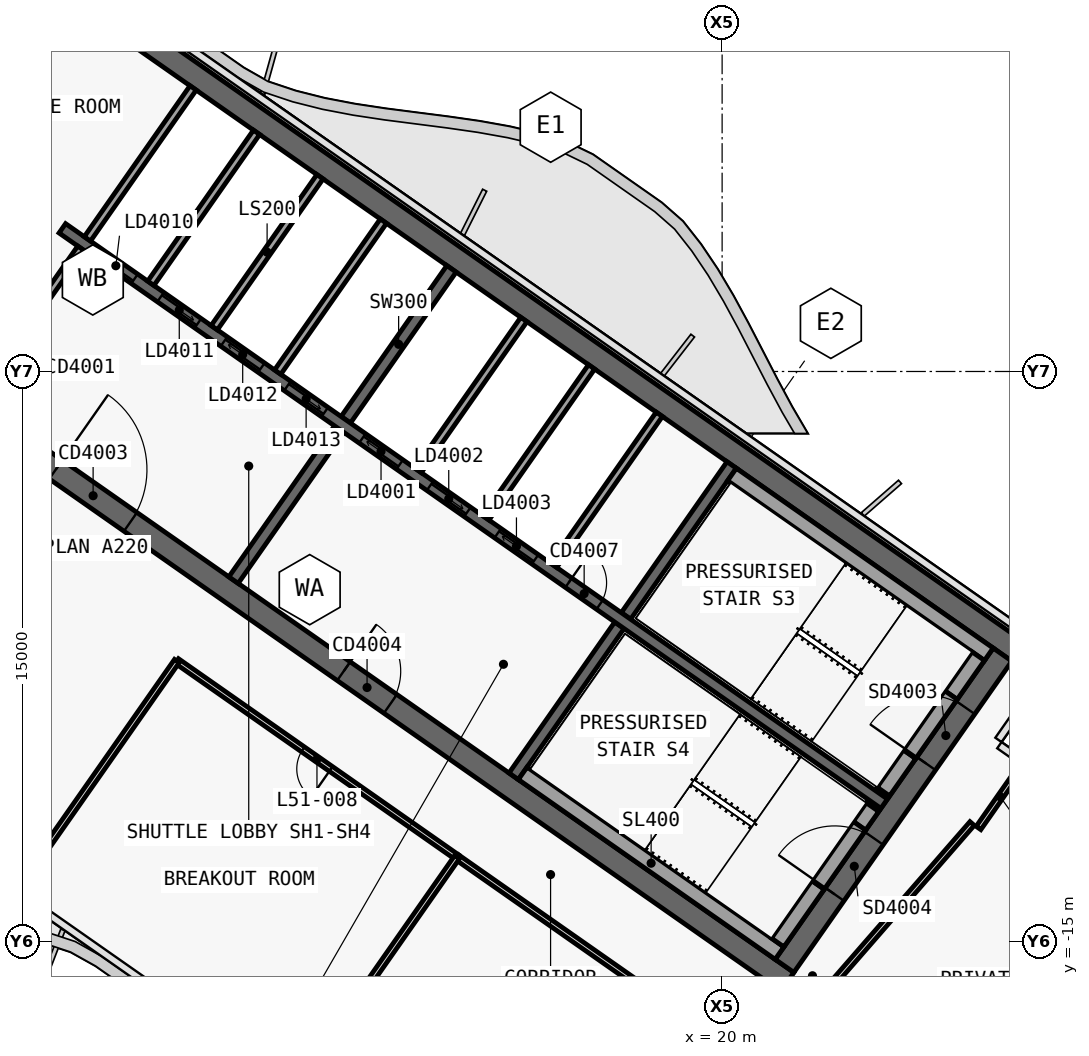
"""IFC4 building model, lengths in metres.
Left out: names, types, materials, properties, quantities, classifications, styles, units other than length and angle.
Written with IfcOpenShell. Run it as: python <this file> out.ifc"""

import sys

from ifc_helpers import new_model, si_unit, direction, frame, frame_2d, origin, place, context, subcontext, project, spatial, polyline, rectangle, outline, extrude, element, fill, save


model = new_model("IFC4")
c1 = context("Model", 3, precision=1e-05, world=origin(), true_north=direction((0.0, 1.0)))
c2 = subcontext(c1, "Body", "Model", "MODEL_VIEW")
j1 = project(units=[si_unit("LENGTHUNIT", "METRE"), si_unit("PLANEANGLEUNIT", "RADIAN")], contexts=[c1])
p1 = place(None, origin())
s1 = spatial("IfcSite", under=j1, at=p1, CompositionType="ELEMENT")
p2 = place(p1, origin())
s2 = spatial("IfcBuilding", under=s1, at=p2, CompositionType="ELEMENT")
p3 = place(p2, frame((0.0, 0.0, 219.4)))
s3 = spatial("IfcBuildingStorey", under=s2, at=p3, CompositionType="ELEMENT", Elevation=219.4)
p4 = place(p3, frame((0.028, 12.066, 0.0), z_axis=(0.0, 0.0, 1.0), x_axis=(0.819151382952, -0.573577380837, 0.0)))
e1 = element("IfcWall", 1, at=p4, inside=s3, PredefinedType="SHEAR", context=c2, shape_type="SweptSolid", body=[
    extrude(outline(polyline([(33.898, 0.3), (0.0, 0.3), (0.42, -0.3), (33.898, -0.3), (33.898, 0.3)])), origin(), (0.0, 0.0, 1.0), 6.0),
])
p5 = place(p3, frame((0.028, -0.874, 0.0), z_axis=(0.0, 0.0, 1.0), x_axis=(0.819150035022, -0.573579305871, 0.0)))
e2 = element("IfcWall", 2, at=p5, inside=s3, PredefinedType="SHEAR", context=c2, shape_type="SweptSolid", body=[
    extrude(outline(polyline([(26.476, 0.3), (0.0, 0.3), (0.42, -0.3), (26.476, -0.3), (26.476, 0.3)])), origin(), (0.0, 0.0, 1.0), 6.0),
])
p6 = place(p5, frame((2.976, 0.0, 0.0)))
e3 = element("IfcOpeningElement", 3, at=p6, cuts=e2, PredefinedType="OPENING", context=c2, shape_type="SweptSolid", body=[
    extrude(rectangle(XDim=2.4, YDim=2.1, at=frame_2d((1.2, 1.05))), frame((0.0, 0.31, 0.0), z_axis=(0.0, -1.0, 0.0), x_axis=(1.0, 0.0, 0.0)), (0.0, 0.0, 1.0), 0.62),
])
p7 = place(p5, frame((12.226, 0.0, 0.0)))
e4 = element("IfcOpeningElement", 4, at=p7, cuts=e2, PredefinedType="OPENING", context=c2, shape_type="SweptSolid", body=[
    extrude(rectangle(XDim=1.5, YDim=2.1, at=frame_2d((0.75, 1.05))), frame((0.0, 0.31, 0.0), z_axis=(0.0, -1.0, 0.0), x_axis=(1.0, 0.0, 0.0)), (0.0, 0.0, 1.0), 0.62),
])
p8 = place(p3, frame((21.642, -15.642, 0.0), z_axis=(0.0, 0.0, 1.0), x_axis=(0.573586866468, 0.819144740944, 0.0)))
e5 = element("IfcWall", 5, at=p8, inside=s3, PredefinedType="SHEAR", context=c2, shape_type="SweptSolid", body=[
    extrude(outline(polyline([(10.0, 0.3), (0.0, 0.3), (0.0, -0.3), (10.0, -0.3), (10.0, 0.3)])), origin(), (0.0, 0.0, 1.0), 6.0),
])
p9 = place(p8, frame((6.5, 0.0, 0.0)))
e6 = element("IfcOpeningElement", 6, at=p9, cuts=e5, PredefinedType="OPENING", context=c2, shape_type="SweptSolid", body=[
    extrude(rectangle(XDim=1.8, YDim=2.1, at=frame_2d((0.9, 1.05))), frame((0.0, 0.31, 0.0), z_axis=(0.0, -1.0, 0.0), x_axis=(1.0, 0.0, 0.0)), (0.0, 0.0, 1.0), 0.62),
])
p10 = place(p8, frame((2.3, 0.0, 0.0)))
e7 = element("IfcOpeningElement", 7, at=p10, cuts=e5, PredefinedType="OPENING", context=c2, shape_type="SweptSolid", body=[
    extrude(rectangle(XDim=1.8, YDim=2.1, at=frame_2d((0.9, 1.05))), frame((0.0, 0.31, 0.0), z_axis=(0.0, -1.0, 0.0), x_axis=(1.0, 0.0, 0.0)), (0.0, 0.0, 1.0), 0.62),
])
p11 = place(p3, frame((7.143, -5.49, 0.0), z_axis=(0.0, 0.0, 1.0), x_axis=(0.573617744349, 0.819123118565, 0.0)))
e8 = element("IfcWall", 8, at=p11, inside=s3, PredefinedType="SHEAR", context=c2, shape_type="SweptSolid", body=[
    extrude(outline(polyline([(0.0, 0.15), (0.0, -0.15), (4.85, -0.15), (4.85, 0.15), (0.0, 0.15)])), origin(), (0.0, 0.0, 1.0), 6.0),
])
p12 = place(p3, frame((10.097, -1.271, 0.0), z_axis=(0.0, 0.0, 1.0), x_axis=(0.573560315113, 0.819163332265, 0.0)))
e9 = element("IfcWall", 9, at=p12, inside=s3, PredefinedType="SHEAR", context=c2, shape_type="SweptSolid", body=[
    extrude(outline(polyline([(4.85, -0.15), (4.85, 0.15), (0.0, 0.15), (0.0, -0.15), (4.85, -0.15)])), origin(), (0.0, 0.0, 1.0), 6.0),
])
p13 = place(p3, frame((14.515, -10.652, 0.0), z_axis=(0.0, 0.0, 1.0), x_axis=(0.573560315113, 0.819163332265, 0.0)))
e10 = element("IfcWall", 10, at=p13, inside=s3, PredefinedType="SHEAR", context=c2, shape_type="SweptSolid", body=[
    extrude(outline(polyline([(0.0, 0.15), (0.0, -0.15), (4.85, -0.15), (4.85, 0.15), (0.0, 0.15)])), origin(), (0.0, 0.0, 1.0), 6.0),
])
p14 = place(p3, frame((17.469, -6.433, 0.0), z_axis=(0.0, 0.0, 1.0), x_axis=(0.573594092424, 0.81913968109, 0.0)))
e11 = element("IfcWall", 11, at=p14, inside=s3, PredefinedType="SHEAR", context=c2, shape_type="SweptSolid", body=[
    extrude(outline(polyline([(4.85, -0.15), (4.85, 0.15), (0.0, 0.15), (0.0, -0.15), (4.85, -0.15)])), origin(), (0.0, 0.0, 1.0), 6.0),
])
p15 = place(p3, frame((2.638, 3.768, 0.0), z_axis=(0.0, 0.0, 1.0), x_axis=(0.819155014212, -0.573572194837, 0.0)))
e12 = element("IfcWall", 12, at=p15, inside=s3, PredefinedType="SHEAR", context=c2, shape_type="SweptSolid", body=[
    extrude(outline(polyline([(0.0, 0.15), (0.0, -0.15), (26.4, -0.15), (26.4, 0.15), (0.0, 0.15)])), origin(), (0.0, 0.0, 1.0), 6.0),
])
p16 = place(p15, frame((1.119, 0.0, 0.0)))
e13 = element("IfcOpeningElement", 13, at=p16, cuts=e12, PredefinedType="OPENING", context=c2, shape_type="SweptSolid", body=[
    extrude(rectangle(XDim=1.2, YDim=2.1, at=frame_2d((0.6, 1.05))), frame((0.0, 0.16, 0.0), z_axis=(0.0, -1.0, 0.0), x_axis=(1.0, 0.0, 0.0)), (0.0, 0.0, 1.0), 0.32),
])
p17 = place(p15, frame((3.156, 0.0, 0.0)))
e14 = element("IfcOpeningElement", 14, at=p17, cuts=e12, PredefinedType="OPENING", context=c2, shape_type="SweptSolid", body=[
    extrude(rectangle(XDim=1.2, YDim=2.1, at=frame_2d((0.6, 1.05))), frame((0.0, 0.16, 0.0), z_axis=(0.0, -1.0, 0.0), x_axis=(1.0, 0.0, 0.0)), (0.0, 0.0, 1.0), 0.32),
])
p18 = place(p15, frame((5.194, 0.0, 0.0)))
e15 = element("IfcOpeningElement", 15, at=p18, cuts=e12, PredefinedType="OPENING", context=c2, shape_type="SweptSolid", body=[
    extrude(rectangle(XDim=1.2, YDim=2.1, at=frame_2d((0.6, 1.05))), frame((0.0, 0.16, 0.0), z_axis=(0.0, -1.0, 0.0), x_axis=(1.0, 0.0, 0.0)), (0.0, 0.0, 1.0), 0.32),
])
p19 = place(p15, frame((7.231, 0.0, 0.0)))
e16 = element("IfcOpeningElement", 16, at=p19, cuts=e12, PredefinedType="OPENING", context=c2, shape_type="SweptSolid", body=[
    extrude(rectangle(XDim=1.2, YDim=2.1, at=frame_2d((0.6, 1.05))), frame((0.0, 0.16, 0.0), z_axis=(0.0, -1.0, 0.0), x_axis=(1.0, 0.0, 0.0)), (0.0, 0.0, 1.0), 0.32),
])
p20 = place(p15, frame((9.637, 0.0, 0.0)))
e17 = element("IfcOpeningElement", 17, at=p20, cuts=e12, PredefinedType="OPENING", context=c2, shape_type="SweptSolid", body=[
    extrude(rectangle(XDim=1.2, YDim=2.1, at=frame_2d((0.6, 1.05))), frame((0.0, 0.16, 0.0), z_axis=(0.0, -1.0, 0.0), x_axis=(1.0, 0.0, 0.0)), (0.0, 0.0, 1.0), 0.32),
])
p21 = place(p15, frame((11.812, 0.0, 0.0)))
e18 = element("IfcOpeningElement", 18, at=p21, cuts=e12, PredefinedType="OPENING", context=c2, shape_type="SweptSolid", body=[
    extrude(rectangle(XDim=1.2, YDim=2.1, at=frame_2d((0.6, 1.05))), frame((0.0, 0.16, 0.0), z_axis=(0.0, -1.0, 0.0), x_axis=(1.0, 0.0, 0.0)), (0.0, 0.0, 1.0), 0.32),
])
p22 = place(p15, frame((13.988, 0.0, 0.0)))
e19 = element("IfcOpeningElement", 19, at=p22, cuts=e12, PredefinedType="OPENING", context=c2, shape_type="SweptSolid", body=[
    extrude(rectangle(XDim=1.2, YDim=2.1, at=frame_2d((0.6, 1.05))), frame((0.0, 0.16, 0.0), z_axis=(0.0, -1.0, 0.0), x_axis=(1.0, 0.0, 0.0)), (0.0, 0.0, 1.0), 0.32),
])
p23 = place(p15, frame((16.262, 0.0, 0.0)))
e20 = element("IfcOpeningElement", 20, at=p23, cuts=e12, PredefinedType="OPENING", context=c2, shape_type="SweptSolid", body=[
    extrude(rectangle(XDim=1.0, YDim=2.1, at=frame_2d((0.5, 1.05))), frame((0.0, 0.16, 0.0), z_axis=(0.0, -1.0, 0.0), x_axis=(1.0, 0.0, 0.0)), (0.0, 0.0, 1.0), 0.32),
])
p24 = place(p3, frame((4.967, 2.321, 0.0), z_axis=(0.0, 0.0, 1.0), x_axis=(0.573594092424, 0.81913968109, 0.0)))
e21 = element("IfcWall", 21, at=p24, inside=s3, PredefinedType="SOLIDWALL", context=c2, shape_type="SweptSolid", body=[
    extrude(rectangle(XDim=4.85, YDim=0.2, at=frame_2d((2.425, 0.0))), origin(), (0.0, 0.0, 1.0), 5.72),
])
p25 = place(p3, frame((6.636, 1.152, 0.0), z_axis=(0.0, 0.0, 1.0), x_axis=(0.573560315113, 0.819163332265, 0.0)))
e22 = element("IfcWall", 22, at=p25, inside=s3, PredefinedType="SOLIDWALL", context=c2, shape_type="SweptSolid", body=[
    extrude(rectangle(XDim=4.85, YDim=0.2, at=frame_2d((2.425, 0.0))), origin(), (0.0, 0.0, 1.0), 5.72),
])
p26 = place(p3, frame((8.305, -0.017, 0.0), z_axis=(0.0, 0.0, 1.0), x_axis=(0.573594092424, 0.81913968109, 0.0)))
e23 = element("IfcWall", 23, at=p26, inside=s3, PredefinedType="SOLIDWALL", context=c2, shape_type="SweptSolid", body=[
    extrude(rectangle(XDim=4.85, YDim=0.2, at=frame_2d((2.425, 0.0))), origin(), (0.0, 0.0, 1.0), 5.72),
])
p27 = place(p3, frame((12.001, -2.605, 0.0), z_axis=(0.0, 0.0, 1.0), x_axis=(0.573560315113, 0.819163332265, 0.0)))
e24 = element("IfcWall", 24, at=p27, inside=s3, PredefinedType="SOLIDWALL", context=c2, shape_type="SweptSolid", body=[
    extrude(rectangle(XDim=4.85, YDim=0.2, at=frame_2d((2.425, 0.0))), origin(), (0.0, 0.0, 1.0), 6.0),
])
p28 = place(p3, frame((13.783, -3.852, 0.0), z_axis=(0.0, 0.0, 1.0), x_axis=(0.573594092424, 0.81913968109, 0.0)))
e25 = element("IfcWall", 25, at=p28, inside=s3, PredefinedType="SOLIDWALL", context=c2, shape_type="SweptSolid", body=[
    extrude(rectangle(XDim=4.85, YDim=0.2, at=frame_2d((2.425, 0.0))), origin(), (0.0, 0.0, 1.0), 6.0),
])
p29 = place(p3, frame((15.565, -5.1, 0.0), z_axis=(0.0, 0.0, 1.0), x_axis=(0.573560315113, 0.819163332265, 0.0)))
e26 = element("IfcWall", 26, at=p29, inside=s3, PredefinedType="SOLIDWALL", context=c2, shape_type="SweptSolid", body=[
    extrude(rectangle(XDim=4.85, YDim=0.2, at=frame_2d((2.425, 0.0))), origin(), (0.0, 0.0, 1.0), 6.0),
])
p30 = place(p3, frame((20.259, -2.71, 0.0), z_axis=(0.0, 0.0, 1.0), x_axis=(0.81914849389, -0.573581506813, 0.0)))
e27 = element("IfcWall", 27, at=p30, inside=s3, PredefinedType="SOLIDWALL", context=c2, shape_type="SweptSolid", body=[
    extrude(rectangle(XDim=8.25, YDim=0.4, at=frame_2d((4.125, 0.0))), origin(), (0.0, 0.0, 1.0), 5.72),
])
p31 = place(p3, frame((24.244, -11.055, 0.0), z_axis=(0.0, 0.0, 1.0), x_axis=(0.573571582932, 0.819155442668, 0.0)))
e28 = element("IfcWall", 28, at=p31, inside=s3, PredefinedType="SOLIDWALL", context=c2, shape_type="SweptSolid", body=[
    extrude(rectangle(XDim=1.2, YDim=0.4, at=frame_2d((0.6, 0.0))), origin(), (0.0, 0.0, 1.0), 5.72),
])
p32 = place(p3, frame((26.022, -8.515, 0.0), z_axis=(0.0, 0.0, 1.0), x_axis=(0.573619628835, 0.819121798889, 0.0)))
e29 = element("IfcWall", 29, at=p32, inside=s3, PredefinedType="SOLIDWALL", context=c2, shape_type="SweptSolid", body=[
    extrude(rectangle(XDim=1.25, YDim=0.4, at=frame_2d((0.625, 0.0))), origin(), (0.0, 0.0, 1.0), 5.72),
])
p33 = place(p3, frame((24.932, -10.072, 2.15), z_axis=(0.0, 0.0, 1.0), x_axis=(0.573591692345, 0.819141361715, 0.0)))
e30 = element("IfcWall", 30, at=p33, inside=s3, PredefinedType="SOLIDWALL", context=c2, shape_type="SweptSolid", body=[
    extrude(rectangle(XDim=1.9, YDim=0.4, at=frame_2d((0.95, 0.0))), origin(), (0.0, 0.0, 1.0), 3.57),
])
p34 = place(p3, frame((14.753, -10.574, 0.0), z_axis=(0.0, 0.0, 1.0), x_axis=(0.819158229677, -0.573567602601, 0.0)))
e31 = element("IfcWall", 31, at=p34, inside=s3, PredefinedType="SOLIDWALL", context=c2, shape_type="SweptSolid", body=[
    extrude(rectangle(XDim=8.25, YDim=0.4, at=frame_2d((4.125, 0.0))), origin(), (0.0, 0.0, 1.0), 5.72),
])
p35 = place(p3, frame((21.462, -15.028, 0.0), z_axis=(0.0, 0.0, 1.0), x_axis=(0.573559770908, 0.819163713305, 0.0)))
e32 = element("IfcWall", 32, at=p35, inside=s3, PredefinedType="SOLIDWALL", context=c2, shape_type="SweptSolid", body=[
    extrude(rectangle(XDim=1.85, YDim=0.4, at=frame_2d((0.925, 0.0))), origin(), (0.0, 0.0, 1.0), 5.72),
])
p36 = place(p3, frame((23.613, -11.956, 0.0), z_axis=(0.0, 0.0, 1.0), x_axis=(0.573435029941, 0.819251039936, 0.0)))
e33 = element("IfcWall", 33, at=p36, inside=s3, PredefinedType="SOLIDWALL", context=c2, shape_type="SweptSolid", body=[
    extrude(rectangle(XDim=0.6, YDim=0.4, at=frame_2d((0.3, 0.0))), origin(), (0.0, 0.0, 1.0), 5.72),
])
p37 = place(p3, frame((22.523, -13.512, 2.15), z_axis=(0.0, 0.0, 1.0), x_axis=(0.573591692345, 0.819141361715, 0.0)))
e34 = element("IfcWall", 34, at=p37, inside=s3, PredefinedType="SOLIDWALL", context=c2, shape_type="SweptSolid", body=[
    extrude(rectangle(XDim=1.9, YDim=0.4, at=frame_2d((0.95, 0.0))), origin(), (0.0, 0.0, 1.0), 3.57),
])
p38 = place(p3, frame((0.344, -0.729, 0.0), z_axis=(0.0, 0.0, 1.0), x_axis=(0.573560315113, 0.819163332265, 0.0)))
e35 = element("IfcWall", 35, at=p38, inside=s3, PredefinedType="SOLIDWALL", context=c2, shape_type="SweptSolid", body=[
    extrude(rectangle(XDim=4.85, YDim=0.2, at=frame_2d((2.425, 0.0))), origin(), (0.0, 0.0, 1.0), 5.72),
])
p39 = place(p38, frame((0.55, 0.0, 0.0)))
e36 = element("IfcOpeningElement", 36, at=p39, cuts=e35, PredefinedType="OPENING", context=c2, shape_type="SweptSolid", body=[
    extrude(rectangle(XDim=0.9, YDim=2.1, at=frame_2d((0.45, 1.05))), frame((0.0, 0.11, 0.0), z_axis=(0.0, -1.0, 0.0), x_axis=(1.0, 0.0, 0.0)), (0.0, 0.0, 1.0), 0.22),
])
p40 = place(p3, frame((3.298, 3.49, 0.0), z_axis=(0.0, 0.0, 1.0), x_axis=(0.573560315113, 0.819163332265, 0.0)))
e37 = element("IfcWall", 37, at=p40, inside=s3, PredefinedType="SOLIDWALL", context=c2, shape_type="SweptSolid", body=[
    extrude(rectangle(XDim=4.85, YDim=0.2, at=frame_2d((2.425, 0.0))), origin(), (0.0, 0.0, 1.0), 5.72),
])
p41 = place(p3, frame((13.026, -12.783, 0.0), z_axis=(0.0, 0.0, 1.0), x_axis=(-0.81915291695, 0.57357519006, 0.0)))
e38 = element("IfcWall", 38, at=p41, inside=s3, PredefinedType="PARTITIONING", context=c2, shape_type="SweptSolid", body=[
    extrude(rectangle(XDim=9.002, YDim=0.15, at=frame_2d((4.501, 0.0))), origin(), (0.0, 0.0, 1.0), 5.15),
])
p42 = place(p41, frame((4.051, 0.0, 0.0)))
e39 = element("IfcOpeningElement", 39, at=p42, cuts=e38, PredefinedType="OPENING", context=c2, shape_type="SweptSolid", body=[
    extrude(rectangle(XDim=0.9, YDim=2.1, at=frame_2d((0.45, 1.05))), frame((0.0, 0.085, 0.0), z_axis=(0.0, -1.0, 0.0), x_axis=(1.0, 0.0, 0.0)), (0.0, 0.0, 1.0), 0.17),
])
p43 = place(p3, frame((27.538, -22.945, 0.0), z_axis=(0.0, 0.0, 1.0), x_axis=(-0.819149062641, 0.573580694562, 0.0)))
e40 = element("IfcWall", 40, at=p43, inside=s3, PredefinedType="PARTITIONING", context=c2, shape_type="SweptSolid", body=[
    extrude(rectangle(XDim=17.72, YDim=0.15, at=frame_2d((8.86, 0.0))), origin(), (0.0, 0.0, 1.0), 5.15),
])
p44 = place(p43, frame((7.96, 0.0, 0.0)))
e41 = element("IfcOpeningElement", 41, at=p44, cuts=e40, PredefinedType="OPENING", context=c2, shape_type="SweptSolid", body=[
    extrude(rectangle(XDim=1.8, YDim=2.4, at=frame_2d((0.9, 1.2))), frame((0.0, 0.085, 0.0), z_axis=(0.0, -1.0, 0.0), x_axis=(1.0, 0.0, 0.0)), (0.0, 0.0, 1.0), 0.17),
])
p45 = place(p3, frame((22.285, -16.825, 0.0), z_axis=(0.0, 0.0, 1.0), x_axis=(0.656781429942, 0.754080999153, 0.0)))
e42 = element("IfcWall", 42, at=p45, inside=s3, PredefinedType="PARTITIONING", context=c2, shape_type="SweptSolid", body=[
    extrude(rectangle(XDim=6.536, YDim=0.15, at=frame_2d((3.268, 0.0))), origin(), (0.0, 0.0, 1.0), 5.72),
])
p46 = place(p3, frame((26.746, -12.014, 0.0), z_axis=(0.0, 0.0, 1.0), x_axis=(0.573568836472, 0.819157365729, 0.0)))
e43 = element("IfcWall", 43, at=p46, inside=s3, PredefinedType="PARTITIONING", context=c2, shape_type="SweptSolid", body=[
    extrude(rectangle(XDim=2.0, YDim=0.15, at=frame_2d((1.0, 0.0))), origin(), (0.0, 0.0, 1.0), 5.15),
])
p47 = place(p3, frame((13.024, -12.782, 0.0), z_axis=(0.0, 0.0, 1.0), x_axis=(-0.573556251799, -0.819166177294, 0.0)))
e44 = element("IfcWall", 44, at=p47, inside=s3, PredefinedType="PARTITIONING", context=c2, shape_type="SweptSolid", body=[
    extrude(rectangle(XDim=6.63, YDim=0.15, at=frame_2d((3.315, 0.0))), origin(), (0.0, 0.0, 1.0), 5.15),
])
p48 = place(p3, frame((1.849, -13.051, 0.0), z_axis=(0.0, 0.0, 1.0), x_axis=(0.57357355307, 0.819154063177, 0.0)))
e45 = element("IfcWall", 45, at=p48, inside=s3, PredefinedType="PARTITIONING", context=c2, shape_type="SweptSolid", body=[
    extrude(rectangle(XDim=6.63, YDim=0.15, at=frame_2d((3.315, 0.0))), origin(), (0.0, 0.0, 1.0), 5.15),
])
p49 = place(p16, origin())
e46 = element("IfcDoor", 46, at=p49, inside=s3, OperationType="SLIDING_TO_LEFT", PredefinedType="DOOR", context=c2, shape_type="SweptSolid", body=[
    extrude(rectangle(XDim=1.2, YDim=2.1, at=frame_2d((0.6, 1.05))), frame((0.0, 0.025, 0.0), z_axis=(0.0, -1.0, 0.0), x_axis=(1.0, 0.0, 0.0)), (0.0, 0.0, 1.0), 0.05),
])
fill(e13, e46)
p50 = place(p17, origin())
e47 = element("IfcDoor", 47, at=p50, inside=s3, OperationType="SLIDING_TO_RIGHT", PredefinedType="DOOR", context=c2, shape_type="SweptSolid", body=[
    extrude(rectangle(XDim=1.2, YDim=2.1, at=frame_2d((0.6, 1.05))), frame((0.0, 0.025, 0.0), z_axis=(0.0, -1.0, 0.0), x_axis=(1.0, 0.0, 0.0)), (0.0, 0.0, 1.0), 0.05),
])
fill(e14, e47)
p51 = place(p18, origin())
e48 = element("IfcDoor", 48, at=p51, inside=s3, OperationType="SLIDING_TO_LEFT", PredefinedType="DOOR", context=c2, shape_type="SweptSolid", body=[
    extrude(rectangle(XDim=1.2, YDim=2.1, at=frame_2d((0.6, 1.05))), frame((0.0, 0.025, 0.0), z_axis=(0.0, -1.0, 0.0), x_axis=(1.0, 0.0, 0.0)), (0.0, 0.0, 1.0), 0.05),
])
fill(e15, e48)
p52 = place(p19, origin())
e49 = element("IfcDoor", 49, at=p52, inside=s3, OperationType="SLIDING_TO_RIGHT", PredefinedType="DOOR", context=c2, shape_type="SweptSolid", body=[
    extrude(rectangle(XDim=1.2, YDim=2.1, at=frame_2d((0.6, 1.05))), frame((0.0, 0.025, 0.0), z_axis=(0.0, -1.0, 0.0), x_axis=(1.0, 0.0, 0.0)), (0.0, 0.0, 1.0), 0.05),
])
fill(e16, e49)
p53 = place(p20, origin())
e50 = element("IfcDoor", 50, at=p53, inside=s3, OperationType="SLIDING_TO_LEFT", PredefinedType="DOOR", context=c2, shape_type="SweptSolid", body=[
    extrude(rectangle(XDim=1.2, YDim=2.1, at=frame_2d((0.6, 1.05))), frame((0.0, 0.025, 0.0), z_axis=(0.0, -1.0, 0.0), x_axis=(1.0, 0.0, 0.0)), (0.0, 0.0, 1.0), 0.05),
])
fill(e17, e50)
p54 = place(p21, origin())
e51 = element("IfcDoor", 51, at=p54, inside=s3, OperationType="SLIDING_TO_RIGHT", PredefinedType="DOOR", context=c2, shape_type="SweptSolid", body=[
    extrude(rectangle(XDim=1.2, YDim=2.1, at=frame_2d((0.6, 1.05))), frame((0.0, 0.025, 0.0), z_axis=(0.0, -1.0, 0.0), x_axis=(1.0, 0.0, 0.0)), (0.0, 0.0, 1.0), 0.05),
])
fill(e18, e51)
p55 = place(p22, origin())
e52 = element("IfcDoor", 52, at=p55, inside=s3, OperationType="SLIDING_TO_LEFT", PredefinedType="DOOR", context=c2, shape_type="SweptSolid", body=[
    extrude(rectangle(XDim=1.2, YDim=2.1, at=frame_2d((0.6, 1.05))), frame((0.0, 0.025, 0.0), z_axis=(0.0, -1.0, 0.0), x_axis=(1.0, 0.0, 0.0)), (0.0, 0.0, 1.0), 0.05),
])
fill(e19, e52)
p56 = place(p23, origin())
e53 = element("IfcDoor", 53, at=p56, inside=s3, OperationType="SINGLE_SWING_RIGHT", PredefinedType="DOOR", context=c2, shape_type="SweptSolid", body=[
    extrude(rectangle(XDim=1.0, YDim=2.1, at=frame_2d((0.5, 1.05))), frame((0.0, 0.025, 0.0), z_axis=(0.0, -1.0, 0.0), x_axis=(1.0, 0.0, 0.0)), (0.0, 0.0, 1.0), 0.05),
])
fill(e20, e53)
p57 = place(p6, origin())
e54 = element("IfcDoor", 54, at=p57, inside=s3, OperationType="DOUBLE_DOOR_SINGLE_SWING", PredefinedType="DOOR", context=c2, shape_type="SweptSolid", body=[
    extrude(rectangle(XDim=2.4, YDim=2.1, at=frame_2d((1.2, 1.05))), frame((0.0, 0.025, 0.0), z_axis=(0.0, -1.0, 0.0), x_axis=(1.0, 0.0, 0.0)), (0.0, 0.0, 1.0), 0.05),
])
fill(e3, e54)
p58 = place(p7, origin())
e55 = element("IfcDoor", 55, at=p58, inside=s3, OperationType="DOUBLE_DOOR_SINGLE_SWING", PredefinedType="DOOR", context=c2, shape_type="SweptSolid", body=[
    extrude(rectangle(XDim=1.5, YDim=2.1, at=frame_2d((0.75, 1.05))), frame((0.0, 0.025, 0.0), z_axis=(0.0, -1.0, 0.0), x_axis=(1.0, 0.0, 0.0)), (0.0, 0.0, 1.0), 0.05),
])
fill(e4, e55)
p59 = place(p9, origin())
e56 = element("IfcDoor", 56, at=p59, inside=s3, OperationType="DOUBLE_DOOR_SINGLE_SWING", PredefinedType="DOOR", context=c2, shape_type="SweptSolid", body=[
    extrude(rectangle(XDim=1.8, YDim=2.1, at=frame_2d((0.9, 1.05))), frame((0.0, 0.025, 0.0), z_axis=(0.0, -1.0, 0.0), x_axis=(1.0, 0.0, 0.0)), (0.0, 0.0, 1.0), 0.05),
])
fill(e6, e56)
p60 = place(p10, origin())
e57 = element("IfcDoor", 57, at=p60, inside=s3, OperationType="DOUBLE_DOOR_SINGLE_SWING", PredefinedType="DOOR", context=c2, shape_type="SweptSolid", body=[
    extrude(rectangle(XDim=1.8, YDim=2.1, at=frame_2d((0.9, 1.05))), frame((0.0, 0.025, 0.0), z_axis=(0.0, -1.0, 0.0), x_axis=(1.0, 0.0, 0.0)), (0.0, 0.0, 1.0), 0.05),
])
fill(e7, e57)
p61 = place(p42, origin())
e58 = element("IfcDoor", 58, at=p61, inside=s3, OperationType="SINGLE_SWING_LEFT", PredefinedType="DOOR", context=c2, shape_type="SweptSolid", body=[
    extrude(rectangle(XDim=0.9, YDim=2.1, at=frame_2d((0.45, 1.05))), frame((0.0, 0.025, 0.0), z_axis=(0.0, -1.0, 0.0), x_axis=(1.0, 0.0, 0.0)), (0.0, 0.0, 1.0), 0.05),
])
fill(e39, e58)
save(model, sys.argv[1])
